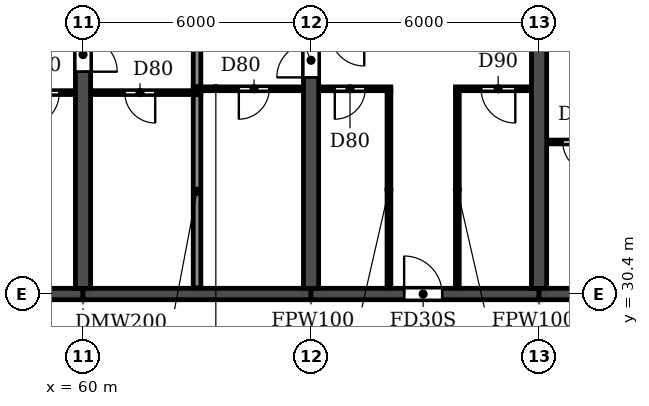
"""IFC4 building model, lengths in metres.
Left out: names, types, materials, properties, quantities, classifications, styles, units other than length and angle.
Written with IfcOpenShell. Run it as: python <this file> out.ifc"""

import sys

from ifc_helpers import new_model, si_unit, direction, frame, frame_2d, origin, place, context, subcontext, project, spatial, rectangle, extrude, element, fill, save


model = new_model("IFC4")
c1 = context("Model", 3, precision=1e-05, world=origin(), true_north=direction((0.0, 1.0)))
c2 = subcontext(c1, "Body", "Model", "MODEL_VIEW")
j1 = project(units=[si_unit("LENGTHUNIT", "METRE"), si_unit("PLANEANGLEUNIT", "RADIAN")], contexts=[c1])
p1 = place(None, origin())
s1 = spatial("IfcSite", under=j1, at=p1, CompositionType="ELEMENT")
p2 = place(p1, origin())
s2 = spatial("IfcBuilding", under=s1, at=p2, CompositionType="ELEMENT")
p3 = place(p2, frame((0.0, 0.0, 43.2)))
s3 = spatial("IfcBuildingStorey", under=s2, at=p3, CompositionType="ELEMENT", Elevation=43.2)
p4 = place(p3, frame((60.0, 30.55, 0.0), z_axis=(0.0, 0.0, 1.0), x_axis=(0.0, 1.0, 0.0)))
e1 = element("IfcWall", 1, at=p4, inside=s3, PredefinedType="SHEAR", context=c2, shape_type="SweptSolid", body=[
    extrude(rectangle(XDim=14.05, YDim=0.4, at=frame_2d((7.025, 0.0))), origin(), (0.0, 0.0, 1.0), 3.05),
])
p5 = place(p4, frame((5.7, 0.0, 0.0)))
e2 = element("IfcOpeningElement", 2, at=p5, cuts=e1, PredefinedType="OPENING", context=c2, shape_type="SweptSolid", body=[
    extrude(rectangle(XDim=0.9, YDim=2.1, at=frame_2d((0.45, 1.05))), frame((0.0, 0.21, 0.0), z_axis=(0.0, -1.0, 0.0), x_axis=(1.0, 0.0, 0.0)), (0.0, 0.0, 1.0), 0.42),
])
p6 = place(p3, frame((66.0, 30.55, 0.0), z_axis=(0.0, 0.0, 1.0), x_axis=(0.0, 1.0, 0.0)))
e3 = element("IfcWall", 3, at=p6, inside=s3, PredefinedType="SHEAR", context=c2, shape_type="SweptSolid", body=[
    extrude(rectangle(XDim=14.05, YDim=0.4, at=frame_2d((7.025, 0.0))), origin(), (0.0, 0.0, 1.0), 3.05),
])
p7 = place(p6, frame((5.55, 0.0, 0.0)))
e4 = element("IfcOpeningElement", 4, at=p7, cuts=e3, PredefinedType="OPENING", context=c2, shape_type="SweptSolid", body=[
    extrude(rectangle(XDim=0.9, YDim=2.1, at=frame_2d((0.45, 1.05))), frame((0.0, 0.21, 0.0), z_axis=(0.0, -1.0, 0.0), x_axis=(1.0, 0.0, 0.0)), (0.0, 0.0, 1.0), 0.42),
])
p8 = place(p3, frame((72.0, 30.55, 0.0), z_axis=(0.0, 0.0, 1.0), x_axis=(0.0, 1.0, 0.0)))
e5 = element("IfcWall", 5, at=p8, inside=s3, PredefinedType="SHEAR", context=c2, shape_type="SweptSolid", body=[
    extrude(rectangle(XDim=14.05, YDim=0.4, at=frame_2d((7.025, 0.0))), origin(), (0.0, 0.0, 1.0), 3.05),
])
p9 = place(p3, frame((54.0, 30.4, 0.0), z_axis=(0.0, 0.0, 1.0), x_axis=(1.0, 0.0, 0.0)))
e6 = element("IfcWall", 6, at=p9, inside=s3, PredefinedType="SHEAR", context=c2, shape_type="SweptSolid", body=[
    extrude(rectangle(XDim=6.0, YDim=0.3, at=frame_2d((3.0, 0.0))), origin(), (0.0, 0.0, 1.0), 2.45),
])
p10 = place(p9, frame((2.45, 0.0, 0.0)))
e7 = element("IfcOpeningElement", 7, at=p10, cuts=e6, PredefinedType="OPENING", context=c2, shape_type="SweptSolid", body=[
    extrude(rectangle(XDim=1.0, YDim=2.1, at=frame_2d((0.5, 1.05))), frame((0.0, 0.16, 0.0), z_axis=(0.0, -1.0, 0.0), x_axis=(1.0, 0.0, 0.0)), (0.0, 0.0, 1.0), 0.32),
])
p11 = place(p3, frame((60.0, 30.4, 0.0), z_axis=(0.0, 0.0, 1.0), x_axis=(1.0, 0.0, 0.0)))
e8 = element("IfcWall", 8, at=p11, inside=s3, PredefinedType="SHEAR", context=c2, shape_type="SweptSolid", body=[
    extrude(rectangle(XDim=6.0, YDim=0.3, at=frame_2d((3.0, 0.0))), origin(), (0.0, 0.0, 1.0), 2.45),
])
p12 = place(p3, frame((66.0, 30.4, 0.0), z_axis=(0.0, 0.0, 1.0), x_axis=(1.0, 0.0, 0.0)))
e9 = element("IfcWall", 9, at=p12, inside=s3, PredefinedType="SHEAR", context=c2, shape_type="SweptSolid", body=[
    extrude(rectangle(XDim=6.0, YDim=0.3, at=frame_2d((3.0, 0.0))), origin(), (0.0, 0.0, 1.0), 2.45),
])
p13 = place(p12, frame((2.45, 0.0, 0.0)))
e10 = element("IfcOpeningElement", 10, at=p13, cuts=e9, PredefinedType="OPENING", context=c2, shape_type="SweptSolid", body=[
    extrude(rectangle(XDim=1.0, YDim=2.1, at=frame_2d((0.5, 1.05))), frame((0.0, 0.16, 0.0), z_axis=(0.0, -1.0, 0.0), x_axis=(1.0, 0.0, 0.0)), (0.0, 0.0, 1.0), 0.32),
])
p14 = place(p3, frame((72.0, 30.4, 0.0), z_axis=(0.0, 0.0, 1.0), x_axis=(1.0, 0.0, 0.0)))
e11 = element("IfcWall", 11, at=p14, inside=s3, PredefinedType="SHEAR", context=c2, shape_type="SweptSolid", body=[
    extrude(rectangle(XDim=6.0, YDim=0.3, at=frame_2d((3.0, 0.0))), origin(), (0.0, 0.0, 1.0), 2.45),
])
p15 = place(p14, frame((2.45, 0.0, 0.0)))
e12 = element("IfcOpeningElement", 12, at=p15, cuts=e11, PredefinedType="OPENING", context=c2, shape_type="SweptSolid", body=[
    extrude(rectangle(XDim=1.0, YDim=2.1, at=frame_2d((0.5, 1.05))), frame((0.0, 0.16, 0.0), z_axis=(0.0, -1.0, 0.0), x_axis=(1.0, 0.0, 0.0)), (0.0, 0.0, 1.0), 0.32),
])
p16 = place(p3, frame((63.0, 30.56, 0.0), z_axis=(0.0, 0.0, 1.0), x_axis=(0.0, 1.0, 0.0)))
e13 = element("IfcWall", 13, at=p16, inside=s3, PredefinedType="PARTITIONING", context=c2, shape_type="SweptSolid", body=[
    extrude(rectangle(XDim=5.09, YDim=0.2, at=frame_2d((2.545, 0.0))), origin(), (0.0, 0.0, 1.0), 3.05),
])
p17 = place(p3, frame((63.0, 35.85, 0.0), z_axis=(0.0, 0.0, 1.0), x_axis=(0.0, 1.0, 0.0)))
e14 = element("IfcWall", 14, at=p17, inside=s3, PredefinedType="PARTITIONING", context=c2, shape_type="SweptSolid", body=[
    extrude(rectangle(XDim=8.89, YDim=0.2, at=frame_2d((4.445, 0.0))), origin(), (0.0, 0.0, 1.0), 3.05),
])
p18 = place(p3, frame((72.21, 34.4, 0.0), z_axis=(0.0, 0.0, 1.0), x_axis=(1.0, 0.0, 0.0)))
e15 = element("IfcWall", 15, at=p18, inside=s3, PredefinedType="PARTITIONING", context=c2, shape_type="SweptSolid", body=[
    extrude(rectangle(XDim=1.89, YDim=0.1, at=frame_2d((0.945, 0.0))), origin(), (0.0, 0.0, 1.0), 3.05),
])
p19 = place(p18, frame((0.415, 0.0, 0.0)))
e16 = element("IfcOpeningElement", 16, at=p19, cuts=e15, PredefinedType="OPENING", context=c2, shape_type="SweptSolid", body=[
    extrude(rectangle(XDim=0.8, YDim=2.1, at=frame_2d((0.4, 1.05))), frame((0.0, 0.06, 0.0), z_axis=(0.0, -1.0, 0.0), x_axis=(1.0, 0.0, 0.0)), (0.0, 0.0, 1.0), 0.12),
])
p20 = place(p3, frame((57.8, 35.7, 0.0), z_axis=(0.0, 0.0, 1.0), x_axis=(1.0, 0.0, 0.0)))
e17 = element("IfcWall", 17, at=p20, inside=s3, PredefinedType="PARTITIONING", context=c2, shape_type="SweptSolid", body=[
    extrude(rectangle(XDim=1.99, YDim=0.1, at=frame_2d((0.995, 0.0))), origin(), (0.0, 0.0, 1.0), 3.05),
])
p21 = place(p20, frame((0.675, 0.0, 0.0)))
e18 = element("IfcOpeningElement", 18, at=p21, cuts=e17, PredefinedType="OPENING", context=c2, shape_type="SweptSolid", body=[
    extrude(rectangle(XDim=0.9, YDim=2.1, at=frame_2d((0.45, 1.05))), frame((0.0, 0.06, 0.0), z_axis=(0.0, -1.0, 0.0), x_axis=(1.0, 0.0, 0.0)), (0.0, 0.0, 1.0), 0.12),
])
p22 = place(p3, frame((60.21, 35.7, 0.0), z_axis=(0.0, 0.0, 1.0), x_axis=(1.0, 0.0, 0.0)))
e19 = element("IfcWall", 19, at=p22, inside=s3, PredefinedType="PARTITIONING", context=c2, shape_type="SweptSolid", body=[
    extrude(rectangle(XDim=2.89, YDim=0.1, at=frame_2d((1.445, 0.0))), origin(), (0.0, 0.0, 1.0), 3.05),
])
p23 = place(p22, frame((0.89, 0.0, 0.0)))
e20 = element("IfcOpeningElement", 20, at=p23, cuts=e19, PredefinedType="OPENING", context=c2, shape_type="SweptSolid", body=[
    extrude(rectangle(XDim=0.8, YDim=2.1, at=frame_2d((0.4, 1.05))), frame((0.0, 0.06, 0.0), z_axis=(0.0, -1.0, 0.0), x_axis=(1.0, 0.0, 0.0)), (0.0, 0.0, 1.0), 0.12),
])
p24 = place(p3, frame((62.9, 35.8, 0.0), z_axis=(0.0, 0.0, 1.0), x_axis=(1.0, 0.0, 0.0)))
e21 = element("IfcWall", 21, at=p24, inside=s3, PredefinedType="PARTITIONING", context=c2, shape_type="SweptSolid", body=[
    extrude(rectangle(XDim=2.89, YDim=0.1, at=frame_2d((1.445, 0.0))), origin(), (0.0, 0.0, 1.0), 3.05),
])
p25 = place(p24, frame((1.2, 0.0, 0.0)))
e22 = element("IfcOpeningElement", 22, at=p25, cuts=e21, PredefinedType="OPENING", context=c2, shape_type="SweptSolid", body=[
    extrude(rectangle(XDim=0.8, YDim=2.1, at=frame_2d((0.4, 1.05))), frame((0.0, 0.06, 0.0), z_axis=(0.0, -1.0, 0.0), x_axis=(1.0, 0.0, 0.0)), (0.0, 0.0, 1.0), 0.12),
])
p26 = place(p3, frame((66.21, 35.8, 0.0), z_axis=(0.0, 0.0, 1.0), x_axis=(1.0, 0.0, 0.0)))
e23 = element("IfcWall", 23, at=p26, inside=s3, PredefinedType="PARTITIONING", context=c2, shape_type="SweptSolid", body=[
    extrude(rectangle(XDim=1.89, YDim=0.1, at=frame_2d((0.945, 0.0))), origin(), (0.0, 0.0, 1.0), 3.05),
])
p27 = place(p26, frame((0.415, 0.0, 0.0)))
e24 = element("IfcOpeningElement", 24, at=p27, cuts=e23, PredefinedType="OPENING", context=c2, shape_type="SweptSolid", body=[
    extrude(rectangle(XDim=0.8, YDim=2.1, at=frame_2d((0.4, 1.05))), frame((0.0, 0.06, 0.0), z_axis=(0.0, -1.0, 0.0), x_axis=(1.0, 0.0, 0.0)), (0.0, 0.0, 1.0), 0.12),
])
p28 = place(p3, frame((69.8, 35.8, 0.0), z_axis=(0.0, 0.0, 1.0), x_axis=(1.0, 0.0, 0.0)))
e25 = element("IfcWall", 25, at=p28, inside=s3, PredefinedType="PARTITIONING", context=c2, shape_type="SweptSolid", body=[
    extrude(rectangle(XDim=1.99, YDim=0.1, at=frame_2d((0.995, 0.0))), origin(), (0.0, 0.0, 1.0), 3.05),
])
p29 = place(p28, frame((0.675, 0.0, 0.0)))
e26 = element("IfcOpeningElement", 26, at=p29, cuts=e25, PredefinedType="OPENING", context=c2, shape_type="SweptSolid", body=[
    extrude(rectangle(XDim=0.9, YDim=2.1, at=frame_2d((0.45, 1.05))), frame((0.0, 0.06, 0.0), z_axis=(0.0, -1.0, 0.0), x_axis=(1.0, 0.0, 0.0)), (0.0, 0.0, 1.0), 0.12),
])
for number, where, z_axis, x_axis in (
    (27, (68.05, 30.56, 0.0), (0.0, 0.0, 1.0), (0.0, 1.0, 0.0)),
    (28, (69.85, 30.56, 0.0), (0.0, 0.0, 1.0), (0.0, 1.0, 0.0)),
):
    element("IfcWall", number, at=place(p3, frame(where, z_axis=z_axis, x_axis=x_axis)), inside=s3, PredefinedType="PARTITIONING", context=c2, shape_type="SweptSolid", body=[
        extrude(rectangle(XDim=5.19, YDim=0.1, at=frame_2d((2.595, 0.0))), origin(), (0.0, 0.0, 1.0), 3.05),
    ])
p30 = place(p23, frame((0.8, 0.0, 0.0), z_axis=(0.0, 0.0, 1.0), x_axis=(-1.0, 0.0, 0.0)))
e29 = element("IfcDoor", 29, at=p30, inside=s3, OperationType="SINGLE_SWING_LEFT", PredefinedType="DOOR", context=c2, shape_type="SweptSolid", body=[
    extrude(rectangle(XDim=0.8, YDim=2.1, at=frame_2d((0.4, 1.05))), frame((0.0, 0.025, 0.0), z_axis=(0.0, -1.0, 0.0), x_axis=(1.0, 0.0, 0.0)), (0.0, 0.0, 1.0), 0.05),
])
fill(e20, e29)
p31 = place(p21, frame((0.9, 0.0, 0.0), z_axis=(0.0, 0.0, 1.0), x_axis=(-1.0, 0.0, 0.0)))
e30 = element("IfcDoor", 30, at=p31, inside=s3, OperationType="SINGLE_SWING_RIGHT", PredefinedType="DOOR", context=c2, shape_type="SweptSolid", body=[
    extrude(rectangle(XDim=0.9, YDim=2.1, at=frame_2d((0.45, 1.05))), frame((0.0, 0.025, 0.0), z_axis=(0.0, -1.0, 0.0), x_axis=(1.0, 0.0, 0.0)), (0.0, 0.0, 1.0), 0.05),
])
fill(e18, e30)
p32 = place(p5, frame((0.9, 0.0, 0.0), z_axis=(0.0, 0.0, 1.0), x_axis=(-1.0, 0.0, 0.0)))
e31 = element("IfcDoor", 31, at=p32, inside=s3, OperationType="SINGLE_SWING_RIGHT", PredefinedType="DOOR", context=c2, shape_type="SweptSolid", body=[
    extrude(rectangle(XDim=0.9, YDim=2.1, at=frame_2d((0.45, 1.05))), frame((0.0, 0.025, 0.0), z_axis=(0.0, -1.0, 0.0), x_axis=(1.0, 0.0, 0.0)), (0.0, 0.0, 1.0), 0.05),
])
fill(e2, e31)
p33 = place(p25, frame((0.8, 0.0, 0.0), z_axis=(0.0, 0.0, 1.0), x_axis=(-1.0, 0.0, 0.0)))
e32 = element("IfcDoor", 32, at=p33, inside=s3, OperationType="SINGLE_SWING_RIGHT", PredefinedType="DOOR", context=c2, shape_type="SweptSolid", body=[
    extrude(rectangle(XDim=0.8, YDim=2.1, at=frame_2d((0.4, 1.05))), frame((0.0, 0.025, 0.0), z_axis=(0.0, -1.0, 0.0), x_axis=(1.0, 0.0, 0.0)), (0.0, 0.0, 1.0), 0.05),
])
fill(e22, e32)
p34 = place(p7, origin())
e33 = element("IfcDoor", 33, at=p34, inside=s3, OperationType="SINGLE_SWING_LEFT", PredefinedType="DOOR", context=c2, shape_type="SweptSolid", body=[
    extrude(rectangle(XDim=0.9, YDim=2.1, at=frame_2d((0.45, 1.05))), frame((0.0, 0.025, 0.0), z_axis=(0.0, -1.0, 0.0), x_axis=(1.0, 0.0, 0.0)), (0.0, 0.0, 1.0), 0.05),
])
fill(e4, e33)
p35 = place(p27, frame((0.8, 0.0, 0.0), z_axis=(0.0, 0.0, 1.0), x_axis=(-1.0, 0.0, 0.0)))
e34 = element("IfcDoor", 34, at=p35, inside=s3, OperationType="SINGLE_SWING_RIGHT", PredefinedType="DOOR", context=c2, shape_type="SweptSolid", body=[
    extrude(rectangle(XDim=0.8, YDim=2.1, at=frame_2d((0.4, 1.05))), frame((0.0, 0.025, 0.0), z_axis=(0.0, -1.0, 0.0), x_axis=(1.0, 0.0, 0.0)), (0.0, 0.0, 1.0), 0.05),
])
fill(e24, e34)
p36 = place(p13, origin())
e35 = element("IfcDoor", 35, at=p36, inside=s3, OperationType="SINGLE_SWING_LEFT", PredefinedType="DOOR", context=c2, shape_type="SweptSolid", body=[
    extrude(rectangle(XDim=1.0, YDim=2.1, at=frame_2d((0.5, 1.05))), frame((0.0, 0.025, 0.0), z_axis=(0.0, -1.0, 0.0), x_axis=(1.0, 0.0, 0.0)), (0.0, 0.0, 1.0), 0.05),
])
fill(e10, e35)
p37 = place(p29, frame((0.9, 0.0, 0.0), z_axis=(0.0, 0.0, 1.0), x_axis=(-1.0, 0.0, 0.0)))
e36 = element("IfcDoor", 36, at=p37, inside=s3, OperationType="SINGLE_SWING_LEFT", PredefinedType="DOOR", context=c2, shape_type="SweptSolid", body=[
    extrude(rectangle(XDim=0.9, YDim=2.1, at=frame_2d((0.45, 1.05))), frame((0.0, 0.025, 0.0), z_axis=(0.0, -1.0, 0.0), x_axis=(1.0, 0.0, 0.0)), (0.0, 0.0, 1.0), 0.05),
])
fill(e26, e36)
p38 = place(p19, frame((0.8, 0.0, 0.0), z_axis=(0.0, 0.0, 1.0), x_axis=(-1.0, 0.0, 0.0)))
e37 = element("IfcDoor", 37, at=p38, inside=s3, OperationType="SINGLE_SWING_LEFT", PredefinedType="DOOR", context=c2, shape_type="SweptSolid", body=[
    extrude(rectangle(XDim=0.8, YDim=2.1, at=frame_2d((0.4, 1.05))), frame((0.0, 0.025, 0.0), z_axis=(0.0, -1.0, 0.0), x_axis=(1.0, 0.0, 0.0)), (0.0, 0.0, 1.0), 0.05),
])
fill(e16, e37)
save(model, sys.argv[1])
